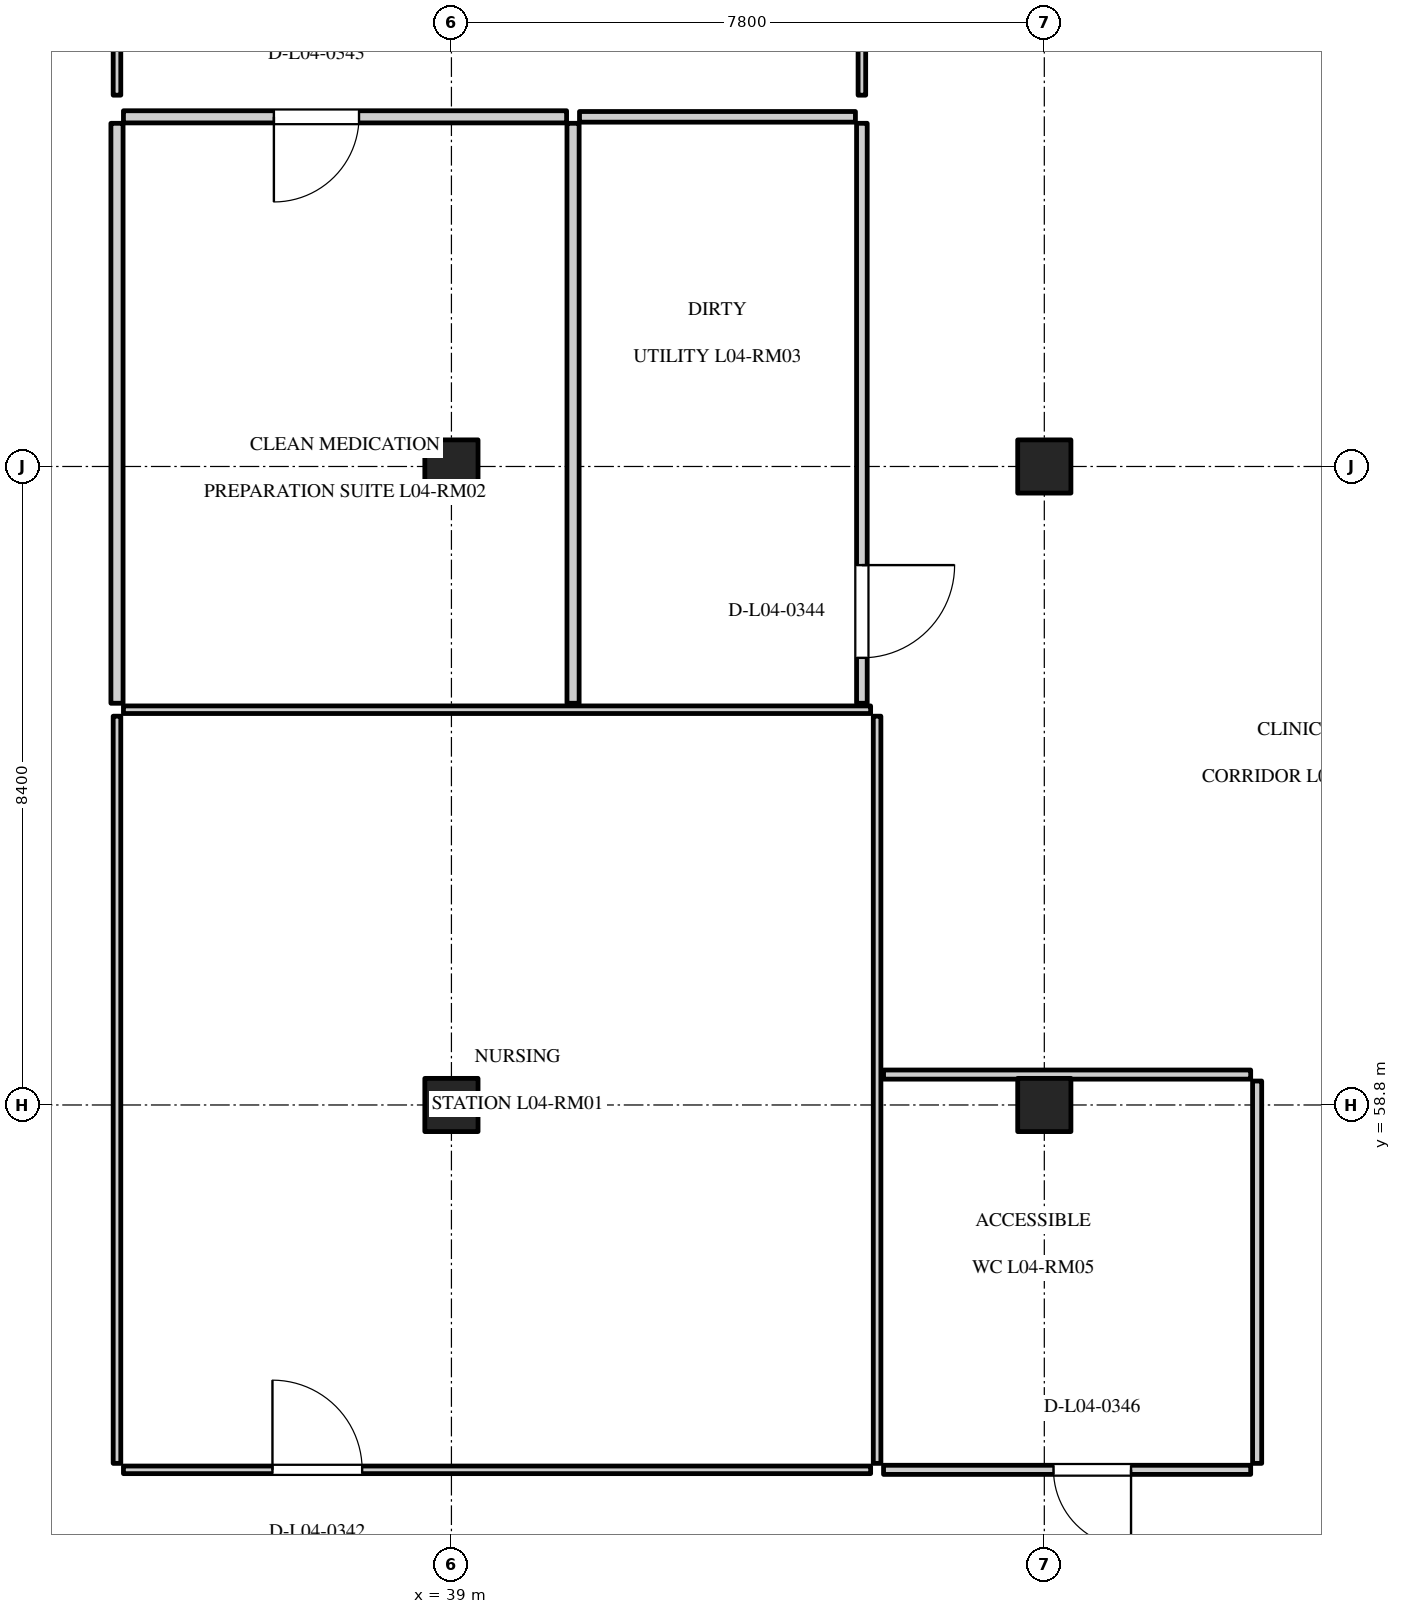
"""IFC4 building model, lengths in metres.
Left out: names, types, materials, properties, quantities, classifications, styles, units other than length and angle.
Written with IfcOpenShell. Run it as: python <this file> out.ifc"""

import sys

from ifc_helpers import new_model, si_unit, direction, frame, frame_2d, origin, origin_2d, place, context, subcontext, project, spatial, rectangle, extrude, element, fill, save


model = new_model("IFC4")
c1 = context("Model", 3, precision=1e-05, world=origin(), true_north=direction((0.0, 1.0)))
c2 = subcontext(c1, "Body", "Model", "MODEL_VIEW")
j1 = project(units=[si_unit("LENGTHUNIT", "METRE"), si_unit("PLANEANGLEUNIT", "RADIAN")], contexts=[c1])
p1 = place(None, origin())
s1 = spatial("IfcSite", under=j1, at=p1, CompositionType="ELEMENT")
p2 = place(p1, origin())
s2 = spatial("IfcBuilding", under=s1, at=p2, CompositionType="ELEMENT")
p3 = place(p2, frame((0.0, 0.0, 18.0)))
s3 = spatial("IfcBuildingStorey", under=s2, at=p3, CompositionType="ELEMENT", Elevation=18.0)
for number, where, z_axis, x_axis in (
    (1, (39.0, 58.8, 0.0), (0.0, 0.0, 1.0), (1.0, 0.0, 0.0)),
    (2, (39.0, 67.2, 0.0), (0.0, 0.0, 1.0), (1.0, 0.0, 0.0)),
    (3, (46.8, 58.8, 0.0), (0.0, 0.0, 1.0), (1.0, 0.0, 0.0)),
    (4, (46.8, 67.2, 0.0), (0.0, 0.0, 1.0), (1.0, 0.0, 0.0)),
):
    element("IfcColumn", number, at=place(p3, frame(where, z_axis=z_axis, x_axis=x_axis)), inside=s3, PredefinedType="COLUMN", context=c2, shape_type="SweptSolid", body=[
        extrude(rectangle(XDim=0.7, YDim=0.7, at=origin_2d()), origin(), (0.0, 0.0, 1.0), 4.2),
    ])
p4 = place(p3, frame((34.685, 54.0, 0.0), z_axis=(0.0, 0.0, 1.0), x_axis=(1.0, 0.0, 0.0)))
e5 = element("IfcWall", 5, at=p4, inside=s3, PredefinedType="PARTITIONING", context=c2, shape_type="SweptSolid", body=[
    extrude(rectangle(XDim=9.83, YDim=0.1, at=frame_2d((4.915, 0.0))), origin(), (0.0, 0.0, 1.0), 3.865),
])
p5 = place(p4, frame((1.96, 0.0, 0.0)))
e6 = element("IfcOpeningElement", 6, at=p5, cuts=e5, PredefinedType="OPENING", context=c2, shape_type="SweptSolid", body=[
    extrude(rectangle(XDim=1.18, YDim=2.2, at=frame_2d((0.59, 1.1))), frame((0.0, 0.062, 0.0), z_axis=(0.0, -1.0, 0.0), x_axis=(1.0, 0.0, 0.0)), (0.0, 0.0, 1.0), 0.124),
])
p6 = place(p3, frame((34.685, 64.0, 0.0), z_axis=(0.0, 0.0, 1.0), x_axis=(1.0, 0.0, 0.0)))
e7 = element("IfcWall", 7, at=p6, inside=s3, PredefinedType="PARTITIONING", context=c2, shape_type="SweptSolid", body=[
    extrude(rectangle(XDim=9.83, YDim=0.1, at=frame_2d((4.915, 0.0))), origin(), (0.0, 0.0, 1.0), 3.865),
])
for number, where, z_axis, x_axis in (
    (8, (34.6, 54.085, 0.0), (0.0, 0.0, 1.0), (0.0, 1.0, 0.0)),
    (9, (44.6, 54.085, 0.0), (0.0, 0.0, 1.0), (0.0, 1.0, 0.0)),
):
    element("IfcWall", number, at=place(p3, frame(where, z_axis=z_axis, x_axis=x_axis)), inside=s3, PredefinedType="PARTITIONING", context=c2, shape_type="SweptSolid", body=[
        extrude(rectangle(XDim=9.83, YDim=0.1, at=frame_2d((4.915, 0.0))), origin(), (0.0, 0.0, 1.0), 3.865),
    ])
p7 = place(p3, frame((34.685, 71.8, 0.0), z_axis=(0.0, 0.0, 1.0), x_axis=(1.0, 0.0, 0.0)))
e10 = element("IfcWall", 10, at=p7, inside=s3, PredefinedType="PARTITIONING", context=c2, shape_type="SweptSolid", body=[
    extrude(rectangle(XDim=5.83, YDim=0.16, at=frame_2d((2.915, 0.0))), origin(), (0.0, 0.0, 1.0), 3.865),
])
p8 = place(p7, frame((1.979, 0.0, 0.0)))
e11 = element("IfcOpeningElement", 11, at=p8, cuts=e10, PredefinedType="OPENING", context=c2, shape_type="SweptSolid", body=[
    extrude(rectangle(XDim=1.12, YDim=2.2, at=frame_2d((0.56, 1.1))), frame((0.0, 0.092, 0.0), z_axis=(0.0, -1.0, 0.0), x_axis=(1.0, 0.0, 0.0)), (0.0, 0.0, 1.0), 0.184),
])
for number, where, z_axis, x_axis in (
    (12, (34.6, 64.085, 0.0), (0.0, 0.0, 1.0), (0.0, 1.0, 0.0)),
    (13, (40.6, 64.085, 0.0), (0.0, 0.0, 1.0), (0.0, 1.0, 0.0)),
):
    element("IfcWall", number, at=place(p3, frame(where, z_axis=z_axis, x_axis=x_axis)), inside=s3, PredefinedType="PARTITIONING", context=c2, shape_type="SweptSolid", body=[
        extrude(rectangle(XDim=7.63, YDim=0.16, at=frame_2d((3.815, 0.0))), origin(), (0.0, 0.0, 1.0), 3.865),
    ])
p9 = place(p3, frame((44.4, 64.085, 0.0), z_axis=(0.0, 0.0, 1.0), x_axis=(0.0, 1.0, 0.0)))
e14 = element("IfcWall", 14, at=p9, inside=s3, PredefinedType="PARTITIONING", context=c2, shape_type="SweptSolid", body=[
    extrude(rectangle(XDim=7.63, YDim=0.14, at=frame_2d((3.815, 0.0))), origin(), (0.0, 0.0, 1.0), 3.865),
])
p10 = place(p9, frame((0.598, 0.0, 0.0)))
e15 = element("IfcOpeningElement", 15, at=p10, cuts=e14, PredefinedType="OPENING", context=c2, shape_type="SweptSolid", body=[
    extrude(rectangle(XDim=1.22, YDim=2.15, at=frame_2d((0.61, 1.075))), frame((0.0, 0.082, 0.0), z_axis=(0.0, -1.0, 0.0), x_axis=(1.0, 0.0, 0.0)), (0.0, 0.0, 1.0), 0.164),
])
p11 = place(p3, frame((40.685, 71.8, 0.0), z_axis=(0.0, 0.0, 1.0), x_axis=(1.0, 0.0, 0.0)))
e16 = element("IfcWall", 16, at=p11, inside=s3, PredefinedType="PARTITIONING", context=c2, shape_type="SweptSolid", body=[
    extrude(rectangle(XDim=3.63, YDim=0.14, at=frame_2d((1.815, 0.0))), origin(), (0.0, 0.0, 1.0), 3.865),
])
for number, where, z_axis, x_axis in (
    (17, (34.6, 72.085, 0.0), (0.0, 0.0, 1.0), (0.0, 1.0, 0.0)),
    (18, (44.4, 72.085, 0.0), (0.0, 0.0, 1.0), (0.0, 1.0, 0.0)),
):
    element("IfcWall", number, at=place(p3, frame(where, z_axis=z_axis, x_axis=x_axis)), inside=s3, PredefinedType="PARTITIONING", context=c2, shape_type="SweptSolid", body=[
        extrude(rectangle(XDim=8.63, YDim=0.1, at=frame_2d((4.315, 0.0))), origin(), (0.0, 0.0, 1.0), 3.865),
    ])
p12 = place(p3, frame((44.685, 54.0, 0.0), z_axis=(0.0, 0.0, 1.0), x_axis=(1.0, 0.0, 0.0)))
e19 = element("IfcWall", 19, at=p12, inside=s3, PredefinedType="PARTITIONING", context=c2, shape_type="SweptSolid", body=[
    extrude(rectangle(XDim=4.83, YDim=0.12, at=frame_2d((2.415, 0.0))), origin(), (0.0, 0.0, 1.0), 3.865),
])
p13 = place(p12, frame((2.236, 0.0, 0.0)))
e20 = element("IfcOpeningElement", 20, at=p13, cuts=e19, PredefinedType="OPENING", context=c2, shape_type="SweptSolid", body=[
    extrude(rectangle(XDim=1.02, YDim=2.15, at=frame_2d((0.51, 1.075))), frame((0.0, 0.072, 0.0), z_axis=(0.0, -1.0, 0.0), x_axis=(1.0, 0.0, 0.0)), (0.0, 0.0, 1.0), 0.144),
])
p14 = place(p3, frame((44.685, 59.2, 0.0), z_axis=(0.0, 0.0, 1.0), x_axis=(1.0, 0.0, 0.0)))
e21 = element("IfcWall", 21, at=p14, inside=s3, PredefinedType="PARTITIONING", context=c2, shape_type="SweptSolid", body=[
    extrude(rectangle(XDim=4.83, YDim=0.12, at=frame_2d((2.415, 0.0))), origin(), (0.0, 0.0, 1.0), 3.865),
])
p15 = place(p3, frame((49.6, 54.085, 0.0), z_axis=(0.0, 0.0, 1.0), x_axis=(0.0, 1.0, 0.0)))
e22 = element("IfcWall", 22, at=p15, inside=s3, PredefinedType="PARTITIONING", context=c2, shape_type="SweptSolid", body=[
    extrude(rectangle(XDim=5.03, YDim=0.12, at=frame_2d((2.515, 0.0))), origin(), (0.0, 0.0, 1.0), 3.865),
])
p16 = place(p5, origin())
e23 = element("IfcDoor", 23, at=p16, inside=s3, OperationType="SINGLE_SWING_LEFT", PredefinedType="DOOR", context=c2, shape_type="SweptSolid", body=[
    extrude(rectangle(XDim=1.18, YDim=2.2, at=frame_2d((0.59, 1.1))), frame((0.0, 0.025, 0.0), z_axis=(0.0, -1.0, 0.0), x_axis=(1.0, 0.0, 0.0)), (0.0, 0.0, 1.0), 0.05),
])
fill(e6, e23)
p17 = place(p8, frame((1.12, 0.0, 0.0), z_axis=(0.0, 0.0, 1.0), x_axis=(-1.0, 0.0, 0.0)))
e24 = element("IfcDoor", 24, at=p17, inside=s3, OperationType="SINGLE_SWING_RIGHT", PredefinedType="DOOR", context=c2, shape_type="SweptSolid", body=[
    extrude(rectangle(XDim=1.12, YDim=2.2, at=frame_2d((0.56, 1.1))), frame((0.0, 0.025, 0.0), z_axis=(0.0, -1.0, 0.0), x_axis=(1.0, 0.0, 0.0)), (0.0, 0.0, 1.0), 0.05),
])
fill(e11, e24)
p18 = place(p10, origin())
e25 = element("IfcDoor", 25, at=p18, inside=s3, OperationType="SINGLE_SWING_RIGHT", PredefinedType="DOOR", context=c2, shape_type="SweptSolid", body=[
    extrude(rectangle(XDim=1.22, YDim=2.15, at=frame_2d((0.61, 1.075))), frame((0.0, 0.025, 0.0), z_axis=(0.0, -1.0, 0.0), x_axis=(1.0, 0.0, 0.0)), (0.0, 0.0, 1.0), 0.05),
])
fill(e15, e25)
p19 = place(p13, origin())
e26 = element("IfcDoor", 26, at=p19, inside=s3, OperationType="SINGLE_SWING_RIGHT", PredefinedType="DOOR", context=c2, shape_type="SweptSolid", body=[
    extrude(rectangle(XDim=1.02, YDim=2.15, at=frame_2d((0.51, 1.075))), frame((0.0, 0.025, 0.0), z_axis=(0.0, -1.0, 0.0), x_axis=(1.0, 0.0, 0.0)), (0.0, 0.0, 1.0), 0.05),
])
fill(e20, e26)
save(model, sys.argv[1])
